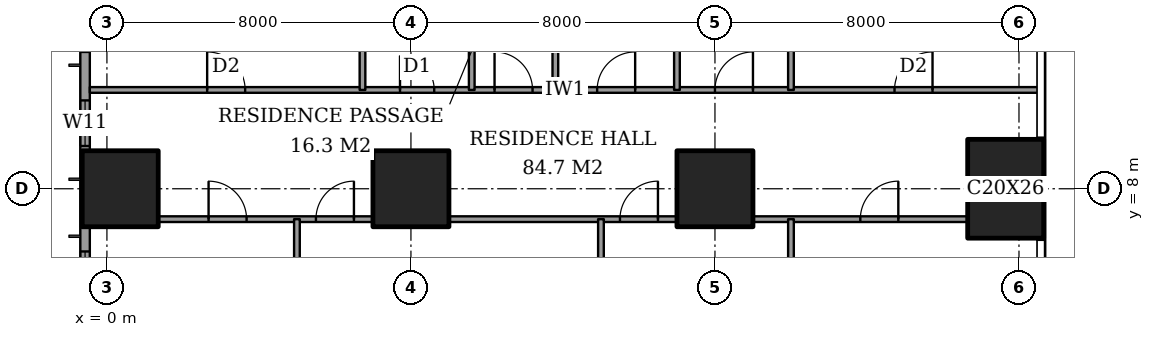
"""IFC4 building model, lengths in metres.
Left out: names, types, materials, properties, quantities, classifications, styles, units other than length and angle.
Written with IfcOpenShell. Run it as: python <this file> out.ifc"""

import sys

from ifc_helpers import new_model, si_unit, direction, frame, frame_2d, origin, origin_2d, place, context, subcontext, project, spatial, rectangle, extrude, element, fill, save


model = new_model("IFC4")
c1 = context("Model", 3, precision=1e-05, world=origin(), true_north=direction((0.0, 1.0)))
c2 = subcontext(c1, "Body", "Model", "MODEL_VIEW")
j1 = project(units=[si_unit("LENGTHUNIT", "METRE"), si_unit("PLANEANGLEUNIT", "RADIAN")], contexts=[c1])
p1 = place(None, origin())
s1 = spatial("IfcSite", under=j1, at=p1, CompositionType="ELEMENT")
p2 = place(p1, origin())
s2 = spatial("IfcBuilding", under=s1, at=p2, CompositionType="ELEMENT")
p3 = place(p2, frame((0.0, 0.0, 161.0)))
s3 = spatial("IfcBuildingStorey", under=s2, at=p3, CompositionType="ELEMENT", Elevation=161.0)
for number, where, z_axis, x_axis in (
    (1, (0.35, 8.0, 0.0), (0.0, 0.0, 1.0), (1.0, 0.0, 0.0)),
    (2, (8.0, 8.0, 0.0), (0.0, 0.0, 1.0), (1.0, 0.0, 0.0)),
    (3, (16.0, 8.0, 0.0), (0.0, 0.0, 1.0), (1.0, 0.0, 0.0)),
):
    element("IfcColumn", number, at=place(p3, frame(where, z_axis=z_axis, x_axis=x_axis)), inside=s3, PredefinedType="COLUMN", context=c2, shape_type="SweptSolid", body=[
        extrude(rectangle(XDim=2.0, YDim=2.0, at=origin_2d()), origin(), (0.0, 0.0, 1.0), 3.6),
    ])
p4 = place(p3, frame((23.65, 8.0, 0.0), z_axis=(0.0, 0.0, 1.0), x_axis=(1.0, 0.0, 0.0)))
e4 = element("IfcColumn", 4, at=p4, inside=s3, PredefinedType="COLUMN", context=c2, shape_type="SweptSolid", body=[
    extrude(rectangle(XDim=2.0, YDim=2.6, at=origin_2d()), origin(), (0.0, 0.0, 1.0), 3.6),
])
p5 = place(p3, frame((-0.575, 44.825, 0.0), z_axis=(0.0, 0.0, 1.0), x_axis=(0.0, -1.0, 0.0)))
e5 = element("IfcWall", 5, at=p5, inside=s3, PredefinedType="SOLIDWALL", context=c2, shape_type="SweptSolid", body=[
    extrude(rectangle(XDim=41.65, YDim=0.25, at=frame_2d((20.825, 0.0))), origin(), (0.0, 0.0, 1.0), 3.6),
])
p6 = place(p5, frame((0.775, 0.0, 0.4)))
e6 = element("IfcOpeningElement", 6, at=p6, cuts=e5, PredefinedType="OPENING", context=c2, shape_type="SweptSolid", body=[
    extrude(rectangle(XDim=2.4, YDim=2.2, at=frame_2d((1.2, 1.1))), frame((0.0, 0.135, 0.0), z_axis=(0.0, -1.0, 0.0), x_axis=(1.0, 0.0, 0.0)), (0.0, 0.0, 1.0), 0.27),
])
p7 = place(p5, frame((6.1, 0.0, 0.4)))
e7 = element("IfcOpeningElement", 7, at=p7, cuts=e5, PredefinedType="OPENING", context=c2, shape_type="SweptSolid", body=[
    extrude(rectangle(XDim=1.2, YDim=2.2, at=frame_2d((0.6, 1.1))), frame((0.0, 0.135, 0.0), z_axis=(0.0, -1.0, 0.0), x_axis=(1.0, 0.0, 0.0)), (0.0, 0.0, 1.0), 0.27),
])
p8 = place(p5, frame((8.425, 0.0, 0.4)))
e8 = element("IfcOpeningElement", 8, at=p8, cuts=e5, PredefinedType="OPENING", context=c2, shape_type="SweptSolid", body=[
    extrude(rectangle(XDim=2.4, YDim=2.2, at=frame_2d((1.2, 1.1))), frame((0.0, 0.135, 0.0), z_axis=(0.0, -1.0, 0.0), x_axis=(1.0, 0.0, 0.0)), (0.0, 0.0, 1.0), 0.27),
])
p9 = place(p5, frame((15.625, 0.0, 0.4)))
e9 = element("IfcOpeningElement", 9, at=p9, cuts=e5, PredefinedType="OPENING", context=c2, shape_type="SweptSolid", body=[
    extrude(rectangle(XDim=2.4, YDim=2.2, at=frame_2d((1.2, 1.1))), frame((0.0, 0.135, 0.0), z_axis=(0.0, -1.0, 0.0), x_axis=(1.0, 0.0, 0.0)), (0.0, 0.0, 1.0), 0.27),
])
p10 = place(p5, frame((23.625, 0.0, 0.4)))
e10 = element("IfcOpeningElement", 10, at=p10, cuts=e5, PredefinedType="OPENING", context=c2, shape_type="SweptSolid", body=[
    extrude(rectangle(XDim=2.4, YDim=2.2, at=frame_2d((1.2, 1.1))), frame((0.0, 0.135, 0.0), z_axis=(0.0, -1.0, 0.0), x_axis=(1.0, 0.0, 0.0)), (0.0, 0.0, 1.0), 0.27),
])
p11 = place(p5, frame((30.825, 0.0, 0.4)))
e11 = element("IfcOpeningElement", 11, at=p11, cuts=e5, PredefinedType="OPENING", context=c2, shape_type="SweptSolid", body=[
    extrude(rectangle(XDim=2.4, YDim=2.2, at=frame_2d((1.2, 1.1))), frame((0.0, 0.135, 0.0), z_axis=(0.0, -1.0, 0.0), x_axis=(1.0, 0.0, 0.0)), (0.0, 0.0, 1.0), 0.27),
])
p12 = place(p5, frame((34.5, 0.0, 0.4)))
e12 = element("IfcOpeningElement", 12, at=p12, cuts=e5, PredefinedType="OPENING", context=c2, shape_type="SweptSolid", body=[
    extrude(rectangle(XDim=1.2, YDim=2.2, at=frame_2d((0.6, 1.1))), frame((0.0, 0.135, 0.0), z_axis=(0.0, -1.0, 0.0), x_axis=(1.0, 0.0, 0.0)), (0.0, 0.0, 1.0), 0.27),
])
p13 = place(p5, frame((38.475, 0.0, 0.4)))
e13 = element("IfcOpeningElement", 13, at=p13, cuts=e5, PredefinedType="OPENING", context=c2, shape_type="SweptSolid", body=[
    extrude(rectangle(XDim=2.4, YDim=2.2, at=frame_2d((1.2, 1.1))), frame((0.0, 0.135, 0.0), z_axis=(0.0, -1.0, 0.0), x_axis=(1.0, 0.0, 0.0)), (0.0, 0.0, 1.0), 0.27),
])
p14 = place(p3, frame((1.35, 7.2, 0.0), z_axis=(0.0, 0.0, 1.0), x_axis=(1.0, 0.0, 0.0)))
e14 = element("IfcWall", 14, at=p14, inside=s3, PredefinedType="PARTITIONING", context=c2, shape_type="SweptSolid", body=[
    extrude(rectangle(XDim=5.65, YDim=0.15, at=frame_2d((2.825, 0.0))), origin(), (0.0, 0.0, 1.0), 3.35),
])
p15 = place(p14, frame((1.325, 0.0, 0.0)))
e15 = element("IfcOpeningElement", 15, at=p15, cuts=e14, PredefinedType="OPENING", context=c2, shape_type="SweptSolid", body=[
    extrude(rectangle(XDim=1.0, YDim=2.1, at=frame_2d((0.5, 1.05))), frame((0.0, 0.085, 0.0), z_axis=(0.0, -1.0, 0.0), x_axis=(1.0, 0.0, 0.0)), (0.0, 0.0, 1.0), 0.17),
])
p16 = place(p14, frame((4.15, 0.0, 0.0)))
e16 = element("IfcOpeningElement", 16, at=p16, cuts=e14, PredefinedType="OPENING", context=c2, shape_type="SweptSolid", body=[
    extrude(rectangle(XDim=1.0, YDim=2.1, at=frame_2d((0.5, 1.05))), frame((0.0, 0.085, 0.0), z_axis=(0.0, -1.0, 0.0), x_axis=(1.0, 0.0, 0.0)), (0.0, 0.0, 1.0), 0.17),
])
p17 = place(p3, frame((9.0, 7.2, 0.0), z_axis=(0.0, 0.0, 1.0), x_axis=(1.0, 0.0, 0.0)))
e17 = element("IfcWall", 17, at=p17, inside=s3, PredefinedType="PARTITIONING", context=c2, shape_type="SweptSolid", body=[
    extrude(rectangle(XDim=6.0, YDim=0.15, at=frame_2d((3.0, 0.0))), origin(), (0.0, 0.0, 1.0), 3.35),
])
p18 = place(p17, frame((4.5, 0.0, 0.0)))
e18 = element("IfcOpeningElement", 18, at=p18, cuts=e17, PredefinedType="OPENING", context=c2, shape_type="SweptSolid", body=[
    extrude(rectangle(XDim=1.0, YDim=2.1, at=frame_2d((0.5, 1.05))), frame((0.0, 0.085, 0.0), z_axis=(0.0, -1.0, 0.0), x_axis=(1.0, 0.0, 0.0)), (0.0, 0.0, 1.0), 0.17),
])
p19 = place(p3, frame((17.0, 7.2, 0.0), z_axis=(0.0, 0.0, 1.0), x_axis=(1.0, 0.0, 0.0)))
e19 = element("IfcWall", 19, at=p19, inside=s3, PredefinedType="PARTITIONING", context=c2, shape_type="SweptSolid", body=[
    extrude(rectangle(XDim=5.65, YDim=0.15, at=frame_2d((2.825, 0.0))), origin(), (0.0, 0.0, 1.0), 3.35),
])
p20 = place(p19, frame((2.825, 0.0, 0.0)))
e20 = element("IfcOpeningElement", 20, at=p20, cuts=e19, PredefinedType="OPENING", context=c2, shape_type="SweptSolid", body=[
    extrude(rectangle(XDim=1.0, YDim=2.1, at=frame_2d((0.5, 1.05))), frame((0.0, 0.085, 0.0), z_axis=(0.0, -1.0, 0.0), x_axis=(1.0, 0.0, 0.0)), (0.0, 0.0, 1.0), 0.17),
])
p21 = place(p3, frame((-0.45, 10.6, 0.0), z_axis=(0.0, 0.0, 1.0), x_axis=(1.0, 0.0, 0.0)))
e21 = element("IfcWall", 21, at=p21, inside=s3, PredefinedType="PARTITIONING", context=c2, shape_type="SweptSolid", body=[
    extrude(rectangle(XDim=25.011, YDim=0.15, at=frame_2d((12.505, 0.0))), origin(), (0.0, 0.0, 1.0), 3.35),
])
p22 = place(p21, frame((10.65, 0.0, 0.0)))
e22 = element("IfcOpeningElement", 22, at=p22, cuts=e21, PredefinedType="OPENING", context=c2, shape_type="SweptSolid", body=[
    extrude(rectangle(XDim=1.0, YDim=2.1, at=frame_2d((0.5, 1.05))), frame((0.0, 0.085, 0.0), z_axis=(0.0, -1.0, 0.0), x_axis=(1.0, 0.0, 0.0)), (0.0, 0.0, 1.0), 0.17),
])
p23 = place(p21, frame((3.087, 0.0, 0.0)))
e23 = element("IfcOpeningElement", 23, at=p23, cuts=e21, PredefinedType="OPENING", context=c2, shape_type="SweptSolid", body=[
    extrude(rectangle(XDim=1.0, YDim=2.1, at=frame_2d((0.5, 1.05))), frame((0.0, 0.085, 0.0), z_axis=(0.0, -1.0, 0.0), x_axis=(1.0, 0.0, 0.0)), (0.0, 0.0, 1.0), 0.17),
])
p24 = place(p21, frame((8.163, 0.0, 0.0)))
e24 = element("IfcOpeningElement", 24, at=p24, cuts=e21, PredefinedType="OPENING", context=c2, shape_type="SweptSolid", body=[
    extrude(rectangle(XDim=0.9, YDim=2.1, at=frame_2d((0.45, 1.05))), frame((0.0, 0.085, 0.0), z_axis=(0.0, -1.0, 0.0), x_axis=(1.0, 0.0, 0.0)), (0.0, 0.0, 1.0), 0.17),
])
p25 = place(p21, frame((13.35, 0.0, 0.0)))
e25 = element("IfcOpeningElement", 25, at=p25, cuts=e21, PredefinedType="OPENING", context=c2, shape_type="SweptSolid", body=[
    extrude(rectangle(XDim=1.0, YDim=2.1, at=frame_2d((0.5, 1.05))), frame((0.0, 0.085, 0.0), z_axis=(0.0, -1.0, 0.0), x_axis=(1.0, 0.0, 0.0)), (0.0, 0.0, 1.0), 0.17),
])
p26 = place(p21, frame((16.45, 0.0, 0.0)))
e26 = element("IfcOpeningElement", 26, at=p26, cuts=e21, PredefinedType="OPENING", context=c2, shape_type="SweptSolid", body=[
    extrude(rectangle(XDim=1.0, YDim=2.1, at=frame_2d((0.5, 1.05))), frame((0.0, 0.085, 0.0), z_axis=(0.0, -1.0, 0.0), x_axis=(1.0, 0.0, 0.0)), (0.0, 0.0, 1.0), 0.17),
])
p27 = place(p21, frame((21.175, 0.0, 0.0)))
e27 = element("IfcOpeningElement", 27, at=p27, cuts=e21, PredefinedType="OPENING", context=c2, shape_type="SweptSolid", body=[
    extrude(rectangle(XDim=1.0, YDim=2.1, at=frame_2d((0.5, 1.05))), frame((0.0, 0.085, 0.0), z_axis=(0.0, -1.0, 0.0), x_axis=(1.0, 0.0, 0.0)), (0.0, 0.0, 1.0), 0.17),
])
p28 = place(p3, frame((5.0, -0.45, 0.0), z_axis=(0.0, 0.0, 1.0), x_axis=(0.0, 1.0, 0.0)))
e28 = element("IfcWall", 28, at=p28, inside=s3, PredefinedType="PARTITIONING", context=c2, shape_type="SweptSolid", body=[
    extrude(rectangle(XDim=7.65, YDim=0.15, at=frame_2d((3.825, 0.0))), origin(), (0.0, 0.0, 1.0), 3.35),
])
p29 = place(p3, frame((6.725, 10.6, 0.0), z_axis=(0.0, 0.0, 1.0), x_axis=(0.0, 1.0, 0.0)))
e29 = element("IfcWall", 29, at=p29, inside=s3, PredefinedType="PARTITIONING", context=c2, shape_type="SweptSolid", body=[
    extrude(rectangle(XDim=4.2, YDim=0.15, at=frame_2d((2.1, 0.0))), origin(), (0.0, 0.0, 1.0), 3.35),
])
p30 = place(p3, frame((9.6, 10.6, 0.0), z_axis=(0.0, 0.0, 1.0), x_axis=(0.0, 1.0, 0.0)))
e30 = element("IfcWall", 30, at=p30, inside=s3, PredefinedType="PARTITIONING", context=c2, shape_type="SweptSolid", body=[
    extrude(rectangle(XDim=11.0, YDim=0.15, at=frame_2d((5.5, 0.0))), origin(), (0.0, 0.0, 1.0), 3.35),
])
p31 = place(p30, frame((8.7, 0.0, 0.0)))
e31 = element("IfcOpeningElement", 31, at=p31, cuts=e30, PredefinedType="OPENING", context=c2, shape_type="SweptSolid", body=[
    extrude(rectangle(XDim=1.0, YDim=2.1, at=frame_2d((0.5, 1.05))), frame((0.0, 0.085, 0.0), z_axis=(0.0, -1.0, 0.0), x_axis=(1.0, 0.0, 0.0)), (0.0, 0.0, 1.0), 0.17),
])
p32 = place(p3, frame((11.8, 10.6, 0.0), z_axis=(0.0, 0.0, 1.0), x_axis=(0.0, 1.0, 0.0)))
e32 = element("IfcWall", 32, at=p32, inside=s3, PredefinedType="PARTITIONING", context=c2, shape_type="SweptSolid", body=[
    extrude(rectangle(XDim=7.4, YDim=0.15, at=frame_2d((3.7, 0.0))), origin(), (0.0, 0.0, 1.0), 3.35),
])
p33 = place(p3, frame((13.0, -0.45, 0.0), z_axis=(0.0, 0.0, 1.0), x_axis=(0.0, 1.0, 0.0)))
e33 = element("IfcWall", 33, at=p33, inside=s3, PredefinedType="PARTITIONING", context=c2, shape_type="SweptSolid", body=[
    extrude(rectangle(XDim=7.65, YDim=0.15, at=frame_2d((3.825, 0.0))), origin(), (0.0, 0.0, 1.0), 3.35),
])
p34 = place(p3, frame((15.0, 10.6, 0.0), z_axis=(0.0, 0.0, 1.0), x_axis=(0.0, 1.0, 0.0)))
e34 = element("IfcWall", 34, at=p34, inside=s3, PredefinedType="PARTITIONING", context=c2, shape_type="SweptSolid", body=[
    extrude(rectangle(XDim=4.2, YDim=0.15, at=frame_2d((2.1, 0.0))), origin(), (0.0, 0.0, 1.0), 3.35),
])
p35 = place(p3, frame((18.0, -0.45, 0.0), z_axis=(0.0, 0.0, 1.0), x_axis=(0.0, 1.0, 0.0)))
e35 = element("IfcWall", 35, at=p35, inside=s3, PredefinedType="PARTITIONING", context=c2, shape_type="SweptSolid", body=[
    extrude(rectangle(XDim=7.65, YDim=0.15, at=frame_2d((3.825, 0.0))), origin(), (0.0, 0.0, 1.0), 3.35),
])
p36 = place(p3, frame((18.0, 10.6, 0.0), z_axis=(0.0, 0.0, 1.0), x_axis=(0.0, 1.0, 0.0)))
e36 = element("IfcWall", 36, at=p36, inside=s3, PredefinedType="PARTITIONING", context=c2, shape_type="SweptSolid", body=[
    extrude(rectangle(XDim=7.4, YDim=0.15, at=frame_2d((3.7, 0.0))), origin(), (0.0, 0.0, 1.0), 3.35),
])
p37 = place(p12, origin())
e37 = element("IfcWindow", 37, at=p37, inside=s3, PartitioningType="SINGLE_PANEL", PredefinedType="WINDOW", context=c2, shape_type="SweptSolid", body=[
    extrude(rectangle(XDim=1.2, YDim=2.2, at=frame_2d((0.6, 1.1))), frame((0.0, 0.03, 0.0), z_axis=(0.0, -1.0, 0.0), x_axis=(1.0, 0.0, 0.0)), (0.0, 0.0, 1.0), 0.06),
])
fill(e12, e37)
p38 = place(p13, origin())
e38 = element("IfcWindow", 38, at=p38, inside=s3, PartitioningType="SINGLE_PANEL", PredefinedType="WINDOW", context=c2, shape_type="SweptSolid", body=[
    extrude(rectangle(XDim=2.4, YDim=2.2, at=frame_2d((1.2, 1.1))), frame((0.0, 0.03, 0.0), z_axis=(0.0, -1.0, 0.0), x_axis=(1.0, 0.0, 0.0)), (0.0, 0.0, 1.0), 0.06),
])
fill(e13, e38)
p39 = place(p15, origin())
e39 = element("IfcDoor", 39, at=p39, inside=s3, OperationType="SINGLE_SWING_RIGHT", PredefinedType="DOOR", context=c2, shape_type="SweptSolid", body=[
    extrude(rectangle(XDim=1.0, YDim=2.1, at=frame_2d((0.5, 1.05))), frame((0.0, 0.025, 0.0), z_axis=(0.0, -1.0, 0.0), x_axis=(1.0, 0.0, 0.0)), (0.0, 0.0, 1.0), 0.05),
])
fill(e15, e39)
p40 = place(p16, origin())
e40 = element("IfcDoor", 40, at=p40, inside=s3, OperationType="SINGLE_SWING_LEFT", PredefinedType="DOOR", context=c2, shape_type="SweptSolid", body=[
    extrude(rectangle(XDim=1.0, YDim=2.1, at=frame_2d((0.5, 1.05))), frame((0.0, 0.025, 0.0), z_axis=(0.0, -1.0, 0.0), x_axis=(1.0, 0.0, 0.0)), (0.0, 0.0, 1.0), 0.05),
])
fill(e16, e40)
p41 = place(p18, origin())
e41 = element("IfcDoor", 41, at=p41, inside=s3, OperationType="SINGLE_SWING_LEFT", PredefinedType="DOOR", context=c2, shape_type="SweptSolid", body=[
    extrude(rectangle(XDim=1.0, YDim=2.1, at=frame_2d((0.5, 1.05))), frame((0.0, 0.025, 0.0), z_axis=(0.0, -1.0, 0.0), x_axis=(1.0, 0.0, 0.0)), (0.0, 0.0, 1.0), 0.05),
])
fill(e18, e41)
p42 = place(p20, origin())
e42 = element("IfcDoor", 42, at=p42, inside=s3, OperationType="SINGLE_SWING_LEFT", PredefinedType="DOOR", context=c2, shape_type="SweptSolid", body=[
    extrude(rectangle(XDim=1.0, YDim=2.1, at=frame_2d((0.5, 1.05))), frame((0.0, 0.025, 0.0), z_axis=(0.0, -1.0, 0.0), x_axis=(1.0, 0.0, 0.0)), (0.0, 0.0, 1.0), 0.05),
])
fill(e20, e42)
p43 = place(p22, origin())
e43 = element("IfcDoor", 43, at=p43, inside=s3, OperationType="SINGLE_SWING_RIGHT", PredefinedType="DOOR", context=c2, shape_type="SweptSolid", body=[
    extrude(rectangle(XDim=1.0, YDim=2.1, at=frame_2d((0.5, 1.05))), frame((0.0, 0.025, 0.0), z_axis=(0.0, -1.0, 0.0), x_axis=(1.0, 0.0, 0.0)), (0.0, 0.0, 1.0), 0.05),
])
fill(e22, e43)
p44 = place(p23, origin())
e44 = element("IfcDoor", 44, at=p44, inside=s3, OperationType="SINGLE_SWING_RIGHT", PredefinedType="DOOR", context=c2, shape_type="SweptSolid", body=[
    extrude(rectangle(XDim=1.0, YDim=2.1, at=frame_2d((0.5, 1.05))), frame((0.0, 0.025, 0.0), z_axis=(0.0, -1.0, 0.0), x_axis=(1.0, 0.0, 0.0)), (0.0, 0.0, 1.0), 0.05),
])
fill(e23, e44)
p45 = place(p24, origin())
e45 = element("IfcDoor", 45, at=p45, inside=s3, OperationType="SINGLE_SWING_RIGHT", PredefinedType="DOOR", context=c2, shape_type="SweptSolid", body=[
    extrude(rectangle(XDim=0.9, YDim=2.1, at=frame_2d((0.45, 1.05))), frame((0.0, 0.025, 0.0), z_axis=(0.0, -1.0, 0.0), x_axis=(1.0, 0.0, 0.0)), (0.0, 0.0, 1.0), 0.05),
])
fill(e24, e45)
p46 = place(p25, origin())
e46 = element("IfcDoor", 46, at=p46, inside=s3, OperationType="SINGLE_SWING_LEFT", PredefinedType="DOOR", context=c2, shape_type="SweptSolid", body=[
    extrude(rectangle(XDim=1.0, YDim=2.1, at=frame_2d((0.5, 1.05))), frame((0.0, 0.025, 0.0), z_axis=(0.0, -1.0, 0.0), x_axis=(1.0, 0.0, 0.0)), (0.0, 0.0, 1.0), 0.05),
])
fill(e25, e46)
p47 = place(p26, origin())
e47 = element("IfcDoor", 47, at=p47, inside=s3, OperationType="SINGLE_SWING_LEFT", PredefinedType="DOOR", context=c2, shape_type="SweptSolid", body=[
    extrude(rectangle(XDim=1.0, YDim=2.1, at=frame_2d((0.5, 1.05))), frame((0.0, 0.025, 0.0), z_axis=(0.0, -1.0, 0.0), x_axis=(1.0, 0.0, 0.0)), (0.0, 0.0, 1.0), 0.05),
])
fill(e26, e47)
p48 = place(p27, origin())
e48 = element("IfcDoor", 48, at=p48, inside=s3, OperationType="SINGLE_SWING_LEFT", PredefinedType="DOOR", context=c2, shape_type="SweptSolid", body=[
    extrude(rectangle(XDim=1.0, YDim=2.1, at=frame_2d((0.5, 1.05))), frame((0.0, 0.025, 0.0), z_axis=(0.0, -1.0, 0.0), x_axis=(1.0, 0.0, 0.0)), (0.0, 0.0, 1.0), 0.05),
])
fill(e27, e48)
save(model, sys.argv[1])
